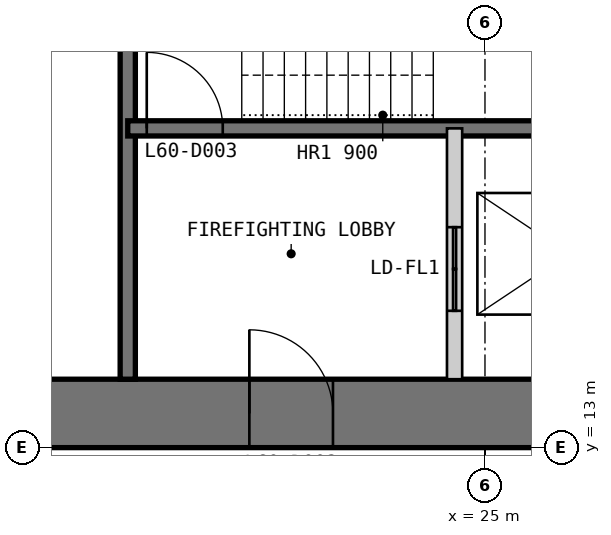
"""IFC4 building model, lengths in metres.
Left out: names, types, materials, properties, quantities, classifications, styles, units other than length and angle.
Written with IfcOpenShell. Run it as: python <this file> out.ifc"""

import sys

from ifc_helpers import new_model, si_unit, direction, frame, frame_2d, origin, place, context, subcontext, project, spatial, polyline, rectangle, outline, extrude, element, fill, save


model = new_model("IFC4")
c1 = context("Model", 3, precision=1e-05, world=origin(), true_north=direction((0.0, 1.0)))
c2 = subcontext(c1, "Body", "Model", "MODEL_VIEW")
j1 = project(units=[si_unit("LENGTHUNIT", "METRE"), si_unit("PLANEANGLEUNIT", "RADIAN")], contexts=[c1])
p1 = place(None, origin())
s1 = spatial("IfcSite", under=j1, at=p1, CompositionType="ELEMENT")
p2 = place(p1, origin())
s2 = spatial("IfcBuilding", under=s1, at=p2, CompositionType="ELEMENT")
p3 = place(p2, frame((0.0, 0.0, 256.0)))
s3 = spatial("IfcBuildingStorey", under=s2, at=p3, CompositionType="ELEMENT", Elevation=256.0)
p4 = place(p3, frame((13.0, 13.45, 0.0), z_axis=(0.0, 0.0, 1.0), x_axis=(1.0, 0.0, 0.0)))
e1 = element("IfcWall", 1, at=p4, inside=s3, PredefinedType="SHEAR", context=c2, shape_type="SweptSolid", body=[
    extrude(outline(polyline([(0.0, -0.45), (24.0, -0.45), (23.1, 0.45), (0.9, 0.45), (0.0, -0.45)])), origin(), (0.0, 0.0, 1.0), 3.4),
])
p5 = place(p4, frame((4.9, 0.0, 0.0)))
e2 = element("IfcOpeningElement", 2, at=p5, cuts=e1, PredefinedType="OPENING", context=c2, shape_type="SweptSolid", body=[
    extrude(rectangle(XDim=1.0, YDim=2.2, at=frame_2d((0.5, 1.1))), frame((0.0, 0.46, 0.0), z_axis=(0.0, -1.0, 0.0), x_axis=(1.0, 0.0, 0.0)), (0.0, 0.0, 1.0), 0.92),
])
p6 = place(p4, frame((8.9, 0.0, 0.0)))
e3 = element("IfcOpeningElement", 3, at=p6, cuts=e1, PredefinedType="OPENING", context=c2, shape_type="SweptSolid", body=[
    extrude(rectangle(XDim=1.1, YDim=2.2, at=frame_2d((0.55, 1.1))), frame((0.0, 0.46, 0.0), z_axis=(0.0, -1.0, 0.0), x_axis=(1.0, 0.0, 0.0)), (0.0, 0.0, 1.0), 0.92),
])
p7 = place(p4, frame((15.05, 0.0, 0.0)))
e4 = element("IfcOpeningElement", 4, at=p7, cuts=e1, PredefinedType="OPENING", context=c2, shape_type="SweptSolid", body=[
    extrude(rectangle(XDim=0.9, YDim=2.2, at=frame_2d((0.45, 1.1))), frame((0.0, 0.46, 0.0), z_axis=(0.0, -1.0, 0.0), x_axis=(1.0, 0.0, 0.0)), (0.0, 0.0, 1.0), 0.92),
])
p8 = place(p4, frame((17.9, 0.0, 0.0)))
e5 = element("IfcOpeningElement", 5, at=p8, cuts=e1, PredefinedType="OPENING", context=c2, shape_type="SweptSolid", body=[
    extrude(rectangle(XDim=1.0, YDim=2.2, at=frame_2d((0.5, 1.1))), frame((0.0, 0.46, 0.0), z_axis=(0.0, -1.0, 0.0), x_axis=(1.0, 0.0, 0.0)), (0.0, 0.0, 1.0), 0.92),
])
p9 = place(p4, frame((21.4, 0.0, 0.0)))
e6 = element("IfcOpeningElement", 6, at=p9, cuts=e1, PredefinedType="OPENING", context=c2, shape_type="SweptSolid", body=[
    extrude(rectangle(XDim=1.0, YDim=2.2, at=frame_2d((0.5, 1.1))), frame((0.0, 0.46, 0.0), z_axis=(0.0, -1.0, 0.0), x_axis=(1.0, 0.0, 0.0)), (0.0, 0.0, 1.0), 0.92),
])
p10 = place(p3, frame((20.3, 13.9, 0.0), z_axis=(0.0, 0.0, 1.0), x_axis=(0.0, 1.0, 0.0)))
e7 = element("IfcWall", 7, at=p10, inside=s3, PredefinedType="SOLIDWALL", context=c2, shape_type="SweptSolid", body=[
    extrude(rectangle(XDim=16.1, YDim=0.2, at=frame_2d((8.05, 0.0))), origin(), (0.0, 0.0, 1.0), 3.2),
])
p11 = place(p10, frame((9.65, 0.0, 0.0)))
e8 = element("IfcOpeningElement", 8, at=p11, cuts=e7, PredefinedType="OPENING", context=c2, shape_type="SweptSolid", body=[
    extrude(rectangle(XDim=0.9, YDim=2.2, at=frame_2d((0.45, 1.1))), frame((0.0, 0.11, 0.0), z_axis=(0.0, -1.0, 0.0), x_axis=(1.0, 0.0, 0.0)), (0.0, 0.0, 1.0), 0.22),
])
p12 = place(p10, frame((14.6, 0.0, 0.0)))
e9 = element("IfcOpeningElement", 9, at=p12, cuts=e7, PredefinedType="OPENING", context=c2, shape_type="SweptSolid", body=[
    extrude(rectangle(XDim=1.0, YDim=2.2, at=frame_2d((0.5, 1.1))), frame((0.0, 0.11, 0.0), z_axis=(0.0, -1.0, 0.0), x_axis=(1.0, 0.0, 0.0)), (0.0, 0.0, 1.0), 0.22),
])
p13 = place(p3, frame((20.3, 17.2, 0.0), z_axis=(0.0, 0.0, 1.0), x_axis=(1.0, 0.0, 0.0)))
e10 = element("IfcWall", 10, at=p13, inside=s3, PredefinedType="SOLIDWALL", context=c2, shape_type="SweptSolid", body=[
    extrude(rectangle(XDim=9.4, YDim=0.2, at=frame_2d((4.7, 0.0))), origin(), (0.0, 0.0, 1.0), 3.2),
])
p14 = place(p13, frame((0.25, 0.0, 0.0)))
e11 = element("IfcOpeningElement", 11, at=p14, cuts=e10, PredefinedType="OPENING", context=c2, shape_type="SweptSolid", body=[
    extrude(rectangle(XDim=1.0, YDim=2.2, at=frame_2d((0.5, 1.1))), frame((0.0, 0.11, 0.0), z_axis=(0.0, -1.0, 0.0), x_axis=(1.0, 0.0, 0.0)), (0.0, 0.0, 1.0), 0.22),
])
p15 = place(p3, frame((24.6, 13.9, 0.0), z_axis=(0.0, 0.0, 1.0), x_axis=(0.0, 1.0, 0.0)))
e12 = element("IfcWall", 12, at=p15, inside=s3, PredefinedType="PARTITIONING", context=c2, shape_type="SweptSolid", body=[
    extrude(rectangle(XDim=3.3, YDim=0.2, at=frame_2d((1.65, 0.0))), origin(), (0.0, 0.0, 1.0), 3.2),
])
p16 = place(p15, frame((0.9, 0.0, 0.0)))
e13 = element("IfcOpeningElement", 13, at=p16, cuts=e12, PredefinedType="OPENING", context=c2, shape_type="SweptSolid", body=[
    extrude(rectangle(XDim=1.1, YDim=2.2, at=frame_2d((0.55, 1.1))), frame((0.0, 0.11, 0.0), z_axis=(0.0, -1.0, 0.0), x_axis=(1.0, 0.0, 0.0)), (0.0, 0.0, 1.0), 0.22),
])
p17 = place(p6, origin())
e14 = element("IfcDoor", 14, at=p17, inside=s3, OperationType="SINGLE_SWING_LEFT", PredefinedType="DOOR", context=c2, shape_type="SweptSolid", body=[
    extrude(rectangle(XDim=1.1, YDim=2.2, at=frame_2d((0.55, 1.1))), frame((0.0, 0.025, 0.0), z_axis=(0.0, -1.0, 0.0), x_axis=(1.0, 0.0, 0.0)), (0.0, 0.0, 1.0), 0.05),
    extrude(outline(polyline([(0.0, 0.0), (0.04, 0.0), (0.04, 2.16), (1.06, 2.16), (1.06, 0.0), (1.1, 0.0), (1.1, 2.2), (0.0, 2.2), (0.0, 0.0)])), frame((0.0, 0.3, 0.0), z_axis=(0.0, -1.0, 0.0), x_axis=(1.0, 0.0, 0.0)), (0.0, 0.0, 1.0), 0.6),
])
fill(e3, e14)
p18 = place(p14, origin())
e15 = element("IfcDoor", 15, at=p18, inside=s3, OperationType="SINGLE_SWING_LEFT", PredefinedType="DOOR", context=c2, shape_type="SweptSolid", body=[
    extrude(rectangle(XDim=1.0, YDim=2.2, at=frame_2d((0.5, 1.1))), frame((0.0, 0.025, 0.0), z_axis=(0.0, -1.0, 0.0), x_axis=(1.0, 0.0, 0.0)), (0.0, 0.0, 1.0), 0.05),
])
fill(e11, e15)
p19 = place(p16, origin())
e16 = element("IfcDoor", 16, at=p19, inside=s3, OperationType="DOUBLE_DOOR_SLIDING", PredefinedType="DOOR", context=c2, shape_type="SweptSolid", body=[
    extrude(rectangle(XDim=1.1, YDim=2.2, at=frame_2d((0.55, 1.1))), frame((0.0, 0.025, 0.0), z_axis=(0.0, -1.0, 0.0), x_axis=(1.0, 0.0, 0.0)), (0.0, 0.0, 1.0), 0.05),
])
fill(e13, e16)
save(model, sys.argv[1])
